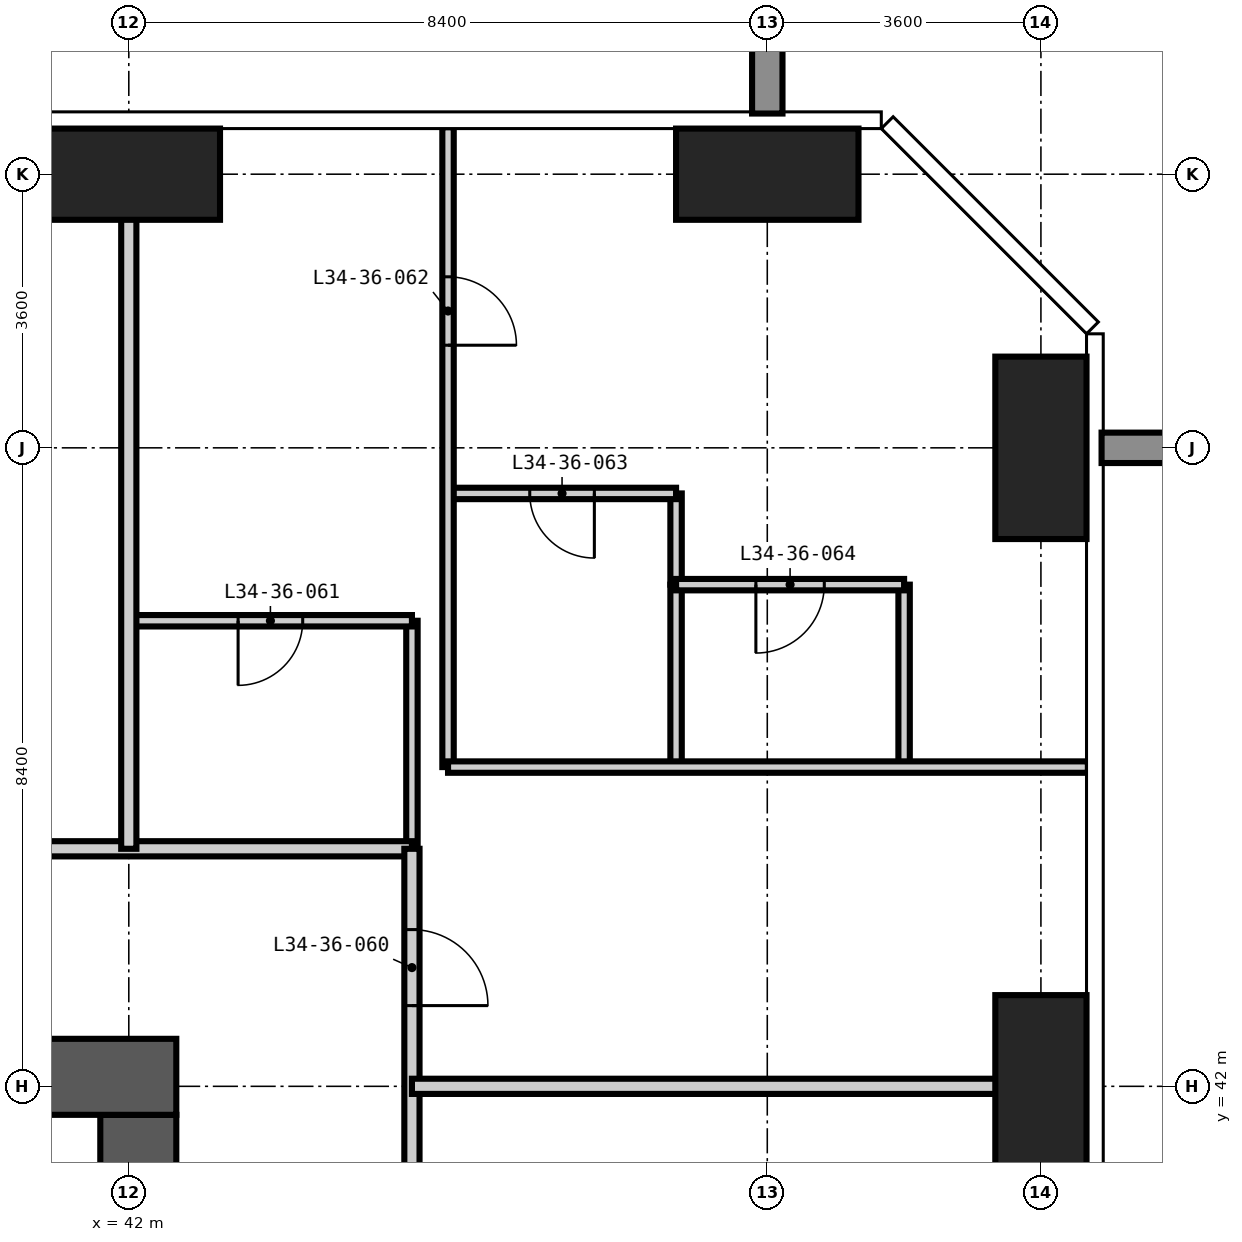
"""IFC4 building model, lengths in metres.
Left out: names, types, materials, properties, quantities, classifications, styles, units other than length and angle.
Written with IfcOpenShell. Run it as: python <this file> out.ifc"""

import sys

from ifc_helpers import new_model, si_unit, direction, frame, frame_2d, origin, origin_2d, place, context, subcontext, project, spatial, rectangle, extrude, element, fill, save


model = new_model("IFC4")
c1 = context("Model", 3, precision=1e-05, world=origin(), true_north=direction((0.0, 1.0)))
c2 = subcontext(c1, "Body", "Model", "MODEL_VIEW")
j1 = project(units=[si_unit("LENGTHUNIT", "METRE"), si_unit("PLANEANGLEUNIT", "RADIAN")], contexts=[c1])
p1 = place(None, origin())
s1 = spatial("IfcSite", under=j1, at=p1, CompositionType="ELEMENT")
p2 = place(p1, origin())
s2 = spatial("IfcBuilding", under=s1, at=p2, CompositionType="ELEMENT")
p3 = place(p2, frame((0.0, 0.0, 133.2)))
s3 = spatial("IfcBuildingStorey", under=s2, at=p3, CompositionType="ELEMENT", Elevation=133.2)
for number, where, z_axis, x_axis in (
    (1, (42.0, 54.0, -0.35), (0.0, 0.0, 1.0), (1.0, 0.0, 0.0)),
    (2, (50.4, 54.0, -0.35), (0.0, 0.0, 1.0), (1.0, 0.0, 0.0)),
):
    element("IfcColumn", number, at=place(p3, frame(where, z_axis=z_axis, x_axis=x_axis)), inside=s3, PredefinedType="COLUMN", context=c2, shape_type="SweptSolid", body=[
        extrude(rectangle(XDim=2.4, YDim=1.2, at=origin_2d()), origin(), (0.0, 0.0, 1.0), 3.6),
    ])
for number, where, z_axis, x_axis in (
    (3, (54.0, 42.0, -0.35), (0.0, 0.0, 1.0), (1.0, 0.0, 0.0)),
    (4, (54.0, 50.4, -0.35), (0.0, 0.0, 1.0), (1.0, 0.0, 0.0)),
):
    element("IfcColumn", number, at=place(p3, frame(where, z_axis=z_axis, x_axis=x_axis)), inside=s3, PredefinedType="COLUMN", context=c2, shape_type="SweptSolid", body=[
        extrude(rectangle(XDim=1.2, YDim=2.4, at=origin_2d()), origin(), (0.0, 0.0, 1.0), 3.6),
    ])
p4 = place(p3, frame((42.125, 17.175, -0.35), z_axis=(0.0, 0.0, 1.0), x_axis=(0.0, 1.0, 0.0)))
e5 = element("IfcWall", 5, at=p4, inside=s3, PredefinedType="SHEAR", context=c2, shape_type="SweptSolid", body=[
    extrude(rectangle(XDim=24.45, YDim=1.0, at=frame_2d((12.225, 0.0))), origin(), (0.0, 0.0, 1.0), 3.6),
])
p5 = place(p4, frame((0.425, 0.0, 0.35)))
e6 = element("IfcOpeningElement", 6, at=p5, cuts=e5, PredefinedType="OPENING", context=c2, shape_type="SweptSolid", body=[
    extrude(rectangle(XDim=1.2, YDim=2.2, at=frame_2d((0.6, 1.1))), frame((0.0, 0.51, 0.0), z_axis=(0.0, -1.0, 0.0), x_axis=(1.0, 0.0, 0.0)), (0.0, 0.0, 1.0), 1.02),
])
p6 = place(p4, frame((11.325, 0.0, 0.35)))
e7 = element("IfcOpeningElement", 7, at=p6, cuts=e5, PredefinedType="OPENING", context=c2, shape_type="SweptSolid", body=[
    extrude(rectangle(XDim=1.8, YDim=2.2, at=frame_2d((0.9, 1.1))), frame((0.0, 0.51, 0.0), z_axis=(0.0, -1.0, 0.0), x_axis=(1.0, 0.0, 0.0)), (0.0, 0.0, 1.0), 1.02),
])
p7 = place(p4, frame((20.125, 0.0, 0.35)))
e8 = element("IfcOpeningElement", 8, at=p7, cuts=e5, PredefinedType="OPENING", context=c2, shape_type="SweptSolid", body=[
    extrude(rectangle(XDim=1.0, YDim=2.1, at=frame_2d((0.5, 1.05))), frame((0.0, 0.51, 0.0), z_axis=(0.0, -1.0, 0.0), x_axis=(1.0, 0.0, 0.0)), (0.0, 0.0, 1.0), 1.02),
])
p8 = place(p3, frame((42.625, 42.125, -0.35), z_axis=(0.0, 0.0, 1.0), x_axis=(-1.0, 0.0, 0.0)))
e9 = element("IfcWall", 9, at=p8, inside=s3, PredefinedType="SHEAR", context=c2, shape_type="SweptSolid", body=[
    extrude(rectangle(XDim=26.45, YDim=1.0, at=frame_2d((13.225, 0.0))), origin(), (0.0, 0.0, 1.0), 3.6),
])
p9 = place(p8, frame((21.125, 0.0, 0.35)))
e10 = element("IfcOpeningElement", 10, at=p9, cuts=e9, PredefinedType="OPENING", context=c2, shape_type="SweptSolid", body=[
    extrude(rectangle(XDim=1.0, YDim=2.1, at=frame_2d((0.5, 1.05))), frame((0.0, 0.51, 0.0), z_axis=(0.0, -1.0, 0.0), x_axis=(1.0, 0.0, 0.0)), (0.0, 0.0, 1.0), 1.02),
])
p10 = place(p8, frame((10.525, 0.0, 0.35)))
e11 = element("IfcOpeningElement", 11, at=p10, cuts=e9, PredefinedType="OPENING", context=c2, shape_type="SweptSolid", body=[
    extrude(rectangle(XDim=1.2, YDim=2.2, at=frame_2d((0.6, 1.1))), frame((0.0, 0.51, 0.0), z_axis=(0.0, -1.0, 0.0), x_axis=(1.0, 0.0, 0.0)), (0.0, 0.0, 1.0), 1.02),
])
p11 = place(p3, frame((45.725, 45.125, 0.0), z_axis=(0.0, 0.0, 1.0), x_axis=(0.0, 1.0, 0.0)))
e12 = element("IfcWall", 12, at=p11, inside=s3, PredefinedType="PARTITIONING", context=c2, shape_type="SweptSolid", body=[
    extrude(rectangle(XDim=3.0, YDim=0.15, at=frame_2d((1.5, 0.0))), origin(), (0.0, 0.0, 1.0), 3.25),
])
p12 = place(p3, frame((49.2, 48.6, 0.0), z_axis=(0.0, 0.0, 1.0), x_axis=(0.0, 1.0, 0.0)))
e13 = element("IfcWall", 13, at=p12, inside=s3, PredefinedType="PARTITIONING", context=c2, shape_type="SweptSolid", body=[
    extrude(rectangle(XDim=1.2, YDim=0.15, at=frame_2d((0.6, 0.0))), origin(), (0.0, 0.0, 1.0), 3.25),
])
p13 = place(p3, frame((42.0, 48.125, 0.0), z_axis=(0.0, 0.0, 1.0), x_axis=(1.0, 0.0, 0.0)))
e14 = element("IfcWall", 14, at=p13, inside=s3, PredefinedType="PARTITIONING", context=c2, shape_type="SweptSolid", body=[
    extrude(rectangle(XDim=3.725, YDim=0.15, at=frame_2d((1.863, 0.0))), origin(), (0.0, 0.0, 1.0), 3.25),
])
p14 = place(p13, frame((1.438, 0.0, 0.0)))
e15 = element("IfcOpeningElement", 15, at=p14, cuts=e14, PredefinedType="OPENING", context=c2, shape_type="SweptSolid", body=[
    extrude(rectangle(XDim=0.85, YDim=2.1, at=frame_2d((0.425, 1.05))), frame((0.0, 0.085, 0.0), z_axis=(0.0, -1.0, 0.0), x_axis=(1.0, 0.0, 0.0)), (0.0, 0.0, 1.0), 0.17),
])
p15 = place(p3, frame((46.2, 49.8, 0.0), z_axis=(0.0, 0.0, 1.0), x_axis=(1.0, 0.0, 0.0)))
e16 = element("IfcWall", 16, at=p15, inside=s3, PredefinedType="PARTITIONING", context=c2, shape_type="SweptSolid", body=[
    extrude(rectangle(XDim=3.0, YDim=0.15, at=frame_2d((1.5, 0.0))), origin(), (0.0, 0.0, 1.0), 3.25),
])
p16 = place(p15, frame((1.075, 0.0, 0.0)))
e17 = element("IfcOpeningElement", 17, at=p16, cuts=e16, PredefinedType="OPENING", context=c2, shape_type="SweptSolid", body=[
    extrude(rectangle(XDim=0.85, YDim=2.1, at=frame_2d((0.425, 1.05))), frame((0.0, 0.085, 0.0), z_axis=(0.0, -1.0, 0.0), x_axis=(1.0, 0.0, 0.0)), (0.0, 0.0, 1.0), 0.17),
])
p17 = place(p3, frame((12.6, 45.125, 0.0), z_axis=(0.0, 0.0, 1.0), x_axis=(1.0, 0.0, 0.0)))
e18 = element("IfcWall", 18, at=p17, inside=s3, PredefinedType="PARTITIONING", context=c2, shape_type="SweptSolid", body=[
    extrude(rectangle(XDim=33.125, YDim=0.2, at=frame_2d((16.562, 0.0))), origin(), (0.0, 0.0, 1.0), 3.25),
])
p18 = place(p17, frame((5.8, 0.0, 0.0)))
e19 = element("IfcOpeningElement", 19, at=p18, cuts=e18, PredefinedType="OPENING", context=c2, shape_type="SweptSolid", body=[
    extrude(rectangle(XDim=1.0, YDim=2.2, at=frame_2d((0.5, 1.1))), frame((0.0, 0.11, 0.0), z_axis=(0.0, -1.0, 0.0), x_axis=(1.0, 0.0, 0.0)), (0.0, 0.0, 1.0), 0.22),
])
p19 = place(p17, frame((12.1, 0.0, 0.0)))
e20 = element("IfcOpeningElement", 20, at=p19, cuts=e18, PredefinedType="OPENING", context=c2, shape_type="SweptSolid", body=[
    extrude(rectangle(XDim=1.0, YDim=2.2, at=frame_2d((0.5, 1.1))), frame((0.0, 0.11, 0.0), z_axis=(0.0, -1.0, 0.0), x_axis=(1.0, 0.0, 0.0)), (0.0, 0.0, 1.0), 0.22),
])
p20 = place(p17, frame((20.5, 0.0, 0.0)))
e21 = element("IfcOpeningElement", 21, at=p20, cuts=e18, PredefinedType="OPENING", context=c2, shape_type="SweptSolid", body=[
    extrude(rectangle(XDim=1.0, YDim=2.2, at=frame_2d((0.5, 1.1))), frame((0.0, 0.11, 0.0), z_axis=(0.0, -1.0, 0.0), x_axis=(1.0, 0.0, 0.0)), (0.0, 0.0, 1.0), 0.22),
])
p21 = place(p17, frame((26.8, 0.0, 0.0)))
e22 = element("IfcOpeningElement", 22, at=p21, cuts=e18, PredefinedType="OPENING", context=c2, shape_type="SweptSolid", body=[
    extrude(rectangle(XDim=1.0, YDim=2.2, at=frame_2d((0.5, 1.1))), frame((0.0, 0.11, 0.0), z_axis=(0.0, -1.0, 0.0), x_axis=(1.0, 0.0, 0.0)), (0.0, 0.0, 1.0), 0.22),
])
p22 = place(p3, frame((45.725, 45.125, 0.0), z_axis=(0.0, 0.0, 1.0), x_axis=(0.0, -1.0, 0.0)))
e23 = element("IfcWall", 23, at=p22, inside=s3, PredefinedType="PARTITIONING", context=c2, shape_type="SweptSolid", body=[
    extrude(rectangle(XDim=30.85, YDim=0.2, at=frame_2d((15.425, 0.0))), origin(), (0.0, 0.0, 1.0), 3.25),
])
p23 = place(p22, frame((21.525, 0.0, 0.0)))
e24 = element("IfcOpeningElement", 24, at=p23, cuts=e23, PredefinedType="OPENING", context=c2, shape_type="SweptSolid", body=[
    extrude(rectangle(XDim=1.0, YDim=2.2, at=frame_2d((0.5, 1.1))), frame((0.0, 0.11, 0.0), z_axis=(0.0, -1.0, 0.0), x_axis=(1.0, 0.0, 0.0)), (0.0, 0.0, 1.0), 0.22),
])
p24 = place(p22, frame((13.125, 0.0, 0.0)))
e25 = element("IfcOpeningElement", 25, at=p24, cuts=e23, PredefinedType="OPENING", context=c2, shape_type="SweptSolid", body=[
    extrude(rectangle(XDim=1.0, YDim=2.2, at=frame_2d((0.5, 1.1))), frame((0.0, 0.11, 0.0), z_axis=(0.0, -1.0, 0.0), x_axis=(1.0, 0.0, 0.0)), (0.0, 0.0, 1.0), 0.22),
])
p25 = place(p22, frame((6.825, 0.0, 0.0)))
e26 = element("IfcOpeningElement", 26, at=p25, cuts=e23, PredefinedType="OPENING", context=c2, shape_type="SweptSolid", body=[
    extrude(rectangle(XDim=1.0, YDim=2.2, at=frame_2d((0.5, 1.1))), frame((0.0, 0.11, 0.0), z_axis=(0.0, -1.0, 0.0), x_axis=(1.0, 0.0, 0.0)), (0.0, 0.0, 1.0), 0.22),
])
p26 = place(p22, frame((29.087, 0.0, 0.0)))
e27 = element("IfcOpeningElement", 27, at=p26, cuts=e23, PredefinedType="OPENING", context=c2, shape_type="SweptSolid", body=[
    extrude(rectangle(XDim=1.0, YDim=2.2, at=frame_2d((0.5, 1.1))), frame((0.0, 0.11, 0.0), z_axis=(0.0, -1.0, 0.0), x_axis=(1.0, 0.0, 0.0)), (0.0, 0.0, 1.0), 0.22),
])
p27 = place(p22, frame((1.063, 0.0, 0.0)))
e28 = element("IfcOpeningElement", 28, at=p27, cuts=e23, PredefinedType="OPENING", context=c2, shape_type="SweptSolid", body=[
    extrude(rectangle(XDim=1.0, YDim=2.2, at=frame_2d((0.5, 1.1))), frame((0.0, 0.11, 0.0), z_axis=(0.0, -1.0, 0.0), x_axis=(1.0, 0.0, 0.0)), (0.0, 0.0, 1.0), 0.22),
])
p28 = place(p3, frame((42.0, 45.125, 0.0), z_axis=(0.0, 0.0, 1.0), x_axis=(0.0, 1.0, 0.0)))
e29 = element("IfcWall", 29, at=p28, inside=s3, PredefinedType="PARTITIONING", context=c2, shape_type="SweptSolid", body=[
    extrude(rectangle(XDim=9.493, YDim=0.2, at=frame_2d((4.747, 0.0))), origin(), (0.0, 0.0, 1.0), 3.25),
])
p29 = place(p3, frame((45.725, 42.0, 0.0), z_axis=(0.0, 0.0, 1.0), x_axis=(1.0, 0.0, 0.0)))
e30 = element("IfcWall", 30, at=p29, inside=s3, PredefinedType="PARTITIONING", context=c2, shape_type="SweptSolid", body=[
    extrude(rectangle(XDim=8.893, YDim=0.2, at=frame_2d((4.446, 0.0))), origin(), (0.0, 0.0, 1.0), 3.25),
])
p30 = place(p3, frame((46.2, 46.2, 0.0), z_axis=(0.0, 0.0, 1.0), x_axis=(0.0, 1.0, 0.0)))
e31 = element("IfcWall", 31, at=p30, inside=s3, PredefinedType="PARTITIONING", context=c2, shape_type="SweptSolid", body=[
    extrude(rectangle(XDim=8.418, YDim=0.15, at=frame_2d((4.209, 0.0))), origin(), (0.0, 0.0, 1.0), 3.25),
])
p31 = place(p30, frame((5.55, 0.0, 0.0)))
e32 = element("IfcOpeningElement", 32, at=p31, cuts=e31, PredefinedType="OPENING", context=c2, shape_type="SweptSolid", body=[
    extrude(rectangle(XDim=0.9, YDim=2.1, at=frame_2d((0.45, 1.05))), frame((0.0, 0.085, 0.0), z_axis=(0.0, -1.0, 0.0), x_axis=(1.0, 0.0, 0.0)), (0.0, 0.0, 1.0), 0.17),
])
for number, where, z_axis, x_axis in (
    (33, (49.2, 46.2, 0.0), (0.0, 0.0, 1.0), (0.0, 1.0, 0.0)),
    (34, (52.2, 46.2, 0.0), (0.0, 0.0, 1.0), (0.0, 1.0, 0.0)),
):
    element("IfcWall", number, at=place(p3, frame(where, z_axis=z_axis, x_axis=x_axis)), inside=s3, PredefinedType="PARTITIONING", context=c2, shape_type="SweptSolid", body=[
        extrude(rectangle(XDim=2.4, YDim=0.15, at=frame_2d((1.2, 0.0))), origin(), (0.0, 0.0, 1.0), 3.25),
    ])
p32 = place(p3, frame((46.2, 46.2, 0.0), z_axis=(0.0, 0.0, 1.0), x_axis=(1.0, 0.0, 0.0)))
e35 = element("IfcWall", 35, at=p32, inside=s3, PredefinedType="PARTITIONING", context=c2, shape_type="SweptSolid", body=[
    extrude(rectangle(XDim=8.418, YDim=0.15, at=frame_2d((4.209, 0.0))), origin(), (0.0, 0.0, 1.0), 3.25),
])
p33 = place(p3, frame((49.2, 48.6, 0.0), z_axis=(0.0, 0.0, 1.0), x_axis=(1.0, 0.0, 0.0)))
e36 = element("IfcWall", 36, at=p33, inside=s3, PredefinedType="PARTITIONING", context=c2, shape_type="SweptSolid", body=[
    extrude(rectangle(XDim=3.0, YDim=0.15, at=frame_2d((1.5, 0.0))), origin(), (0.0, 0.0, 1.0), 3.25),
])
p34 = place(p33, frame((1.05, 0.0, 0.0)))
e37 = element("IfcOpeningElement", 37, at=p34, cuts=e36, PredefinedType="OPENING", context=c2, shape_type="SweptSolid", body=[
    extrude(rectangle(XDim=0.9, YDim=2.1, at=frame_2d((0.45, 1.05))), frame((0.0, 0.085, 0.0), z_axis=(0.0, -1.0, 0.0), x_axis=(1.0, 0.0, 0.0)), (0.0, 0.0, 1.0), 0.17),
])
p35 = place(p27, origin())
e38 = element("IfcDoor", 38, at=p35, inside=s3, OperationType="SINGLE_SWING_RIGHT", PredefinedType="DOOR", context=c2, shape_type="SweptSolid", body=[
    extrude(rectangle(XDim=1.0, YDim=2.2, at=frame_2d((0.5, 1.1))), frame((0.0, 0.025, 0.0), z_axis=(0.0, -1.0, 0.0), x_axis=(1.0, 0.0, 0.0)), (0.0, 0.0, 1.0), 0.05),
])
fill(e28, e38)
p36 = place(p14, frame((0.85, 0.0, 0.0), z_axis=(0.0, 0.0, 1.0), x_axis=(-1.0, 0.0, 0.0)))
e39 = element("IfcDoor", 39, at=p36, inside=s3, OperationType="SINGLE_SWING_RIGHT", PredefinedType="DOOR", context=c2, shape_type="SweptSolid", body=[
    extrude(rectangle(XDim=0.85, YDim=2.1, at=frame_2d((0.425, 1.05))), frame((0.0, 0.025, 0.0), z_axis=(0.0, -1.0, 0.0), x_axis=(1.0, 0.0, 0.0)), (0.0, 0.0, 1.0), 0.05),
])
fill(e15, e39)
p37 = place(p31, frame((0.9, 0.0, 0.0), z_axis=(0.0, 0.0, 1.0), x_axis=(-1.0, 0.0, 0.0)))
e40 = element("IfcDoor", 40, at=p37, inside=s3, OperationType="SINGLE_SWING_RIGHT", PredefinedType="DOOR", context=c2, shape_type="SweptSolid", body=[
    extrude(rectangle(XDim=0.9, YDim=2.1, at=frame_2d((0.45, 1.05))), frame((0.0, 0.025, 0.0), z_axis=(0.0, -1.0, 0.0), x_axis=(1.0, 0.0, 0.0)), (0.0, 0.0, 1.0), 0.05),
])
fill(e32, e40)
p38 = place(p16, frame((0.85, 0.0, 0.0), z_axis=(0.0, 0.0, 1.0), x_axis=(-1.0, 0.0, 0.0)))
e41 = element("IfcDoor", 41, at=p38, inside=s3, OperationType="SINGLE_SWING_LEFT", PredefinedType="DOOR", context=c2, shape_type="SweptSolid", body=[
    extrude(rectangle(XDim=0.85, YDim=2.1, at=frame_2d((0.425, 1.05))), frame((0.0, 0.025, 0.0), z_axis=(0.0, -1.0, 0.0), x_axis=(1.0, 0.0, 0.0)), (0.0, 0.0, 1.0), 0.05),
])
fill(e17, e41)
p39 = place(p34, frame((0.9, 0.0, 0.0), z_axis=(0.0, 0.0, 1.0), x_axis=(-1.0, 0.0, 0.0)))
e42 = element("IfcDoor", 42, at=p39, inside=s3, OperationType="SINGLE_SWING_RIGHT", PredefinedType="DOOR", context=c2, shape_type="SweptSolid", body=[
    extrude(rectangle(XDim=0.9, YDim=2.1, at=frame_2d((0.45, 1.05))), frame((0.0, 0.025, 0.0), z_axis=(0.0, -1.0, 0.0), x_axis=(1.0, 0.0, 0.0)), (0.0, 0.0, 1.0), 0.05),
])
fill(e37, e42)
save(model, sys.argv[1])
